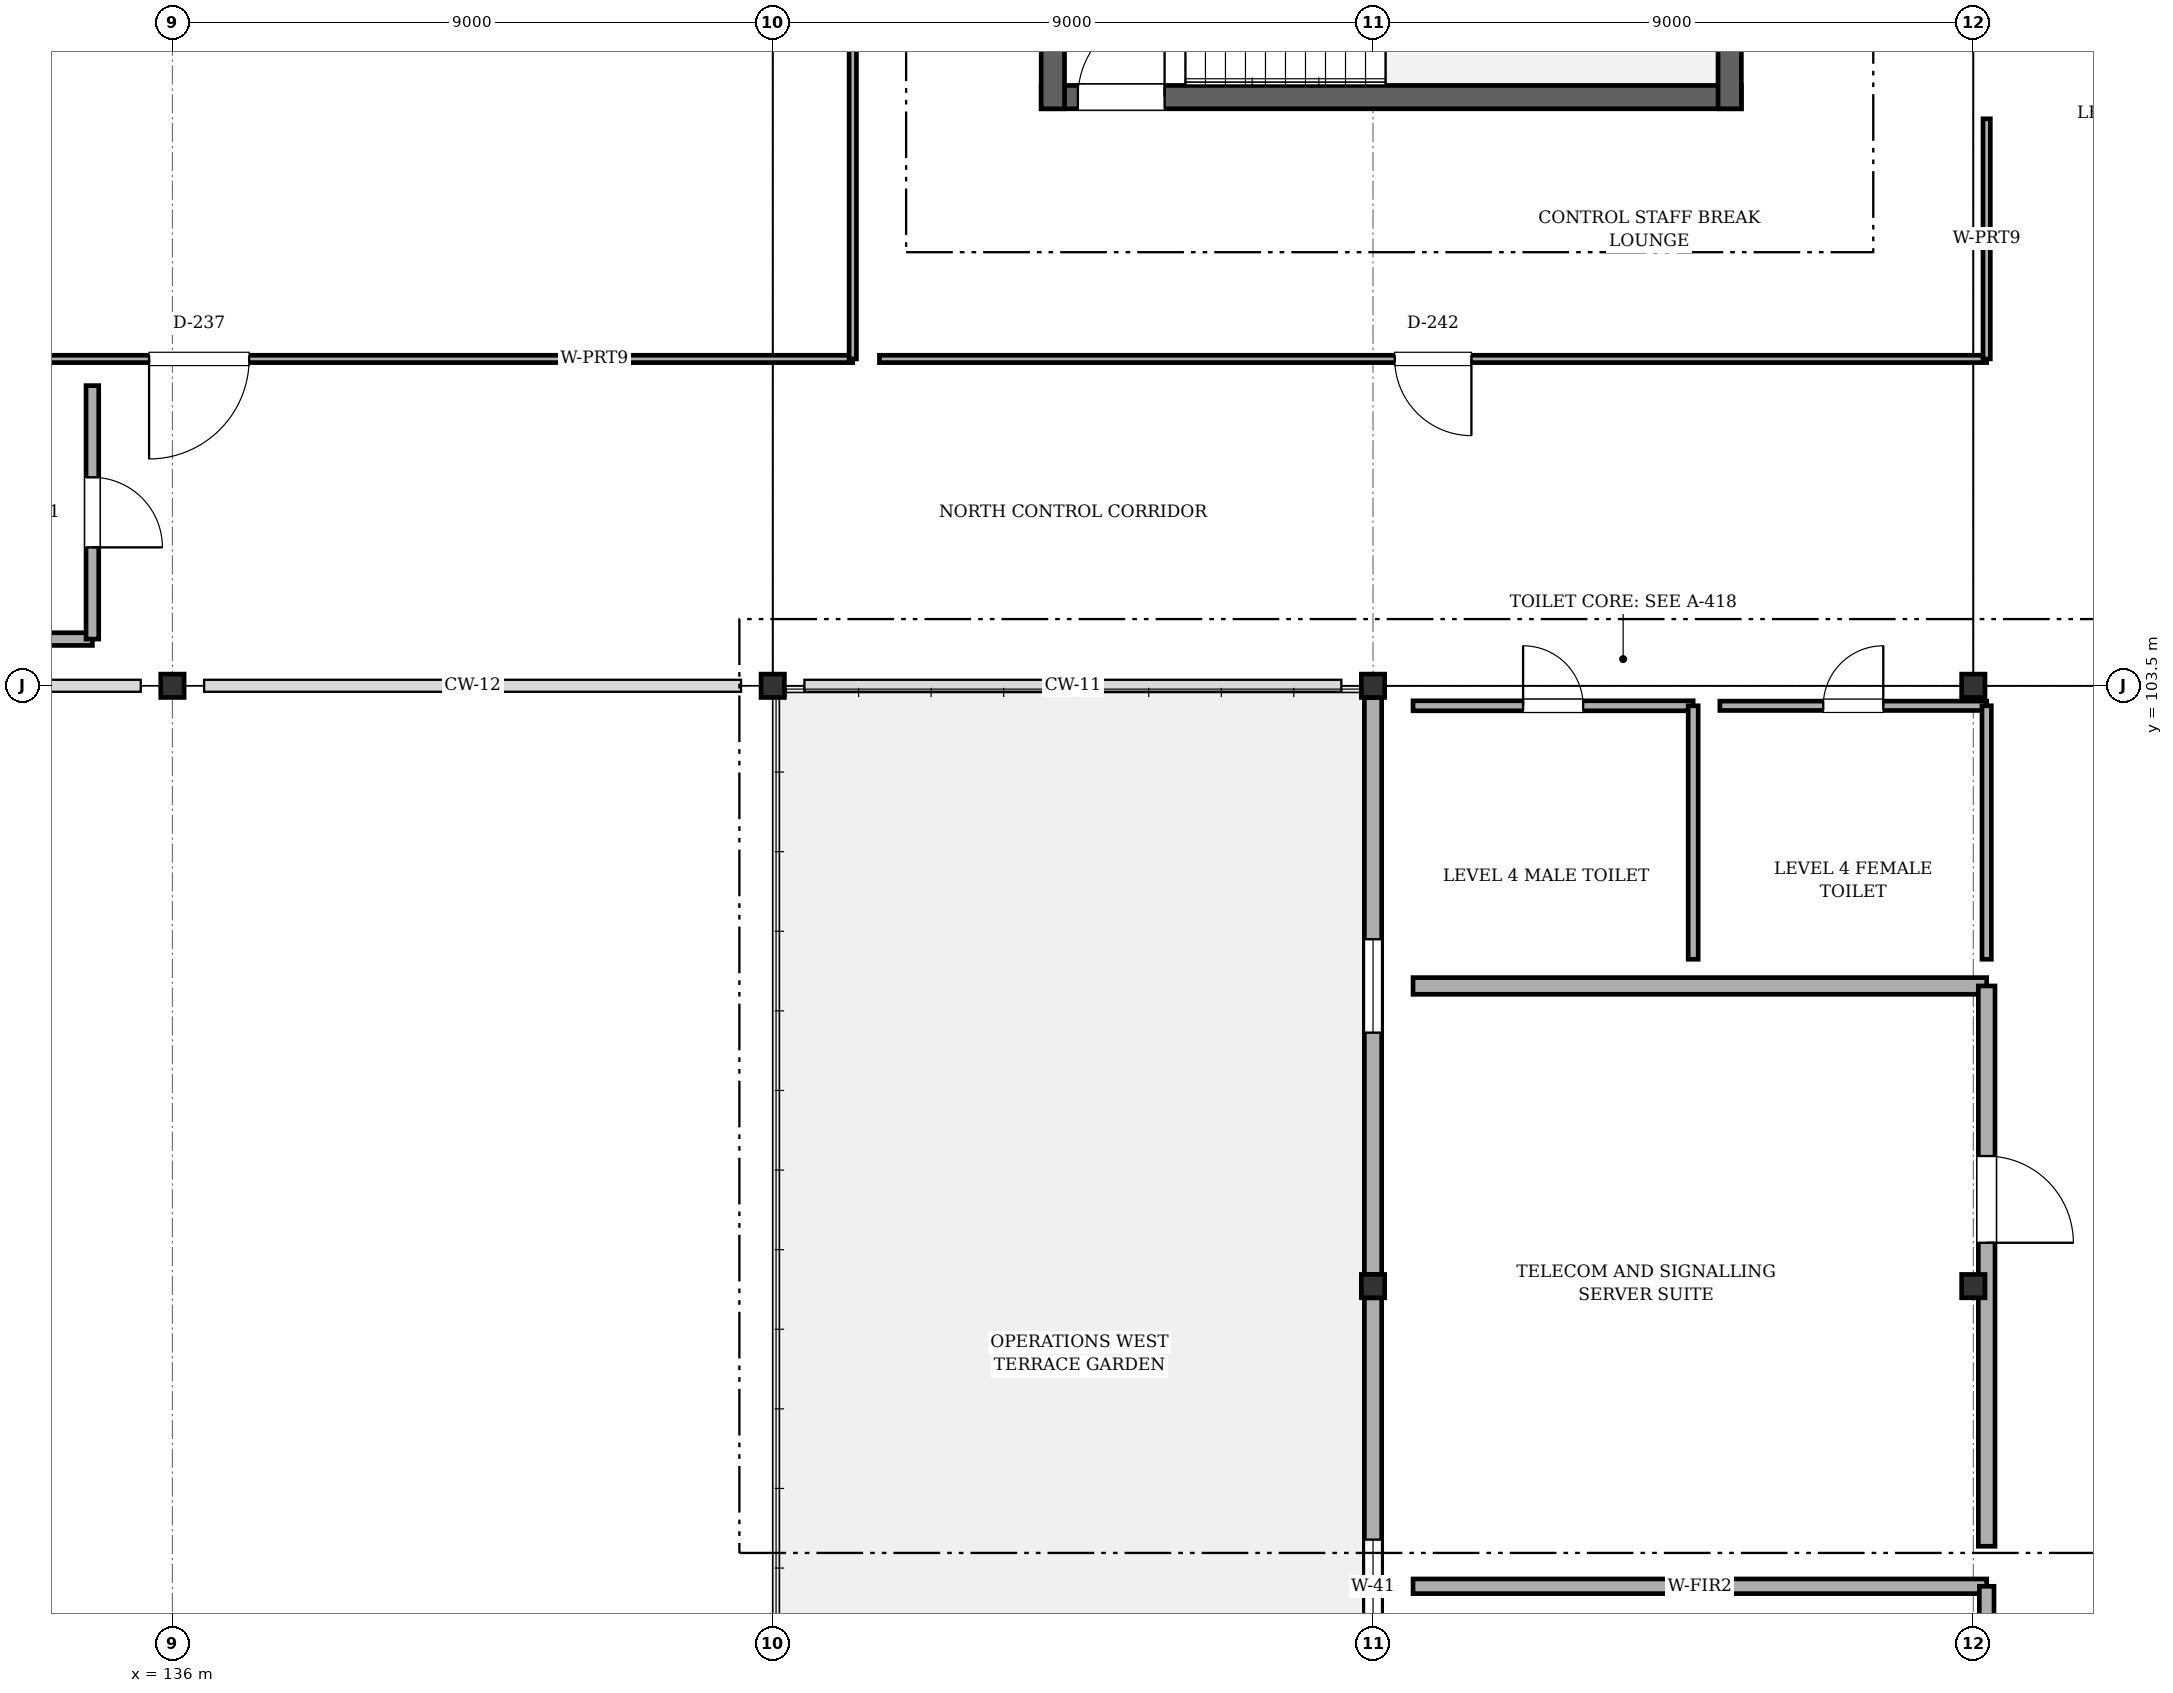
"""IFC4 building model, lengths in metres.
Left out: names, types, materials, properties, quantities, classifications, styles, units other than length and angle.
Written with IfcOpenShell. Run it as: python <this file> out.ifc"""

import sys

from ifc_helpers import new_model, si_unit, direction, frame, frame_2d, origin, origin_2d, place, context, subcontext, project, spatial, rectangle, i_section, extrude, element, fill, save


model = new_model("IFC4")
c1 = context("Model", 3, precision=1e-05, world=origin(), true_north=direction((0.0, 1.0)))
c2 = subcontext(c1, "Body", "Model", "MODEL_VIEW")
j1 = project(units=[si_unit("LENGTHUNIT", "METRE"), si_unit("PLANEANGLEUNIT", "RADIAN")], contexts=[c1])
p1 = place(None, origin())
s1 = spatial("IfcSite", under=j1, at=p1, CompositionType="ELEMENT")
p2 = place(p1, origin())
s2 = spatial("IfcBuilding", under=s1, at=p2, CompositionType="ELEMENT")
p3 = place(p2, frame((0.0, 0.0, 17.6)))
s3 = spatial("IfcBuildingStorey", under=s2, at=p3, CompositionType="ELEMENT", Elevation=17.6)
for number, where, z_axis, x_axis in (
    (1, (136.0, 103.5, 0.0), (0.0, 0.0, 1.0), (1.0, 0.0, 0.0)),
    (2, (145.0, 103.5, 0.0), (0.0, 0.0, 1.0), (1.0, 0.0, 0.0)),
    (3, (154.0, 94.5, 0.0), (0.0, 0.0, 1.0), (1.0, 0.0, 0.0)),
    (4, (154.0, 103.5, 0.0), (0.0, 0.0, 1.0), (1.0, 0.0, 0.0)),
    (5, (163.0, 94.5, 0.0), (0.0, 0.0, 1.0), (1.0, 0.0, 0.0)),
    (6, (163.0, 103.5, 0.0), (0.0, 0.0, 1.0), (1.0, 0.0, 0.0)),
):
    element("IfcColumn", number, at=place(p3, frame(where, z_axis=z_axis, x_axis=x_axis)), inside=s3, PredefinedType="COLUMN", context=c2, shape_type="SweptSolid", body=[
        extrude(i_section(OverallWidth=0.35, OverallDepth=0.35, WebThickness=0.012, FlangeThickness=0.019, FilletRadius=0.02, at=origin_2d()), origin(), (0.0, 0.0, 1.0), 3.2),
    ])
p4 = place(p3, frame((154.0, 85.675, 0.0), z_axis=(0.0, 0.0, 1.0), x_axis=(0.0, 1.0, 0.0)))
e7 = element("IfcWall", 7, at=p4, inside=s3, PredefinedType="SOLIDWALL", context=c2, shape_type="SweptSolid", body=[
    extrude(rectangle(XDim=8.65, YDim=0.26, at=frame_2d((4.325, 0.0))), origin(), (0.0, 0.0, 1.0), 2.505),
])
p5 = place(p4, frame((3.625, 0.0, 0.75)))
e8 = element("IfcOpeningElement", 8, at=p5, cuts=e7, PredefinedType="OPENING", context=c2, shape_type="SweptSolid", body=[
    extrude(rectangle(XDim=1.4, YDim=1.55, at=frame_2d((0.7, 0.775))), frame((0.0, 0.14, 0.0), z_axis=(0.0, -1.0, 0.0), x_axis=(1.0, 0.0, 0.0)), (0.0, 0.0, 1.0), 0.28),
])
p6 = place(p3, frame((154.0, 94.675, 0.0), z_axis=(0.0, 0.0, 1.0), x_axis=(0.0, 1.0, 0.0)))
e9 = element("IfcWall", 9, at=p6, inside=s3, PredefinedType="SOLIDWALL", context=c2, shape_type="SweptSolid", body=[
    extrude(rectangle(XDim=8.65, YDim=0.26, at=frame_2d((4.325, 0.0))), origin(), (0.0, 0.0, 1.0), 2.505),
])
p7 = place(p6, frame((3.625, 0.0, 0.75)))
e10 = element("IfcOpeningElement", 10, at=p7, cuts=e9, PredefinedType="OPENING", context=c2, shape_type="SweptSolid", body=[
    extrude(rectangle(XDim=1.4, YDim=1.55, at=frame_2d((0.7, 0.775))), frame((0.0, 0.14, 0.0), z_axis=(0.0, -1.0, 0.0), x_axis=(1.0, 0.0, 0.0)), (0.0, 0.0, 1.0), 0.28),
])
p8 = place(p3, frame((149.025, 112.325, 0.0), z_axis=(0.0, 0.0, 1.0), x_axis=(1.0, 0.0, 0.0)))
e11 = element("IfcWall", 11, at=p8, inside=s3, PredefinedType="SHEAR", context=c2, shape_type="SweptSolid", body=[
    extrude(rectangle(XDim=10.498, YDim=0.35, at=frame_2d((5.249, 0.0))), origin(), (0.0, 0.0, 1.0), 3.02),
])
p9 = place(p8, frame((0.55, 0.0, 0.0)))
e12 = element("IfcOpeningElement", 12, at=p9, cuts=e11, PredefinedType="OPENING", context=c2, shape_type="SweptSolid", body=[
    extrude(rectangle(XDim=1.3, YDim=2.1, at=frame_2d((0.65, 1.05))), frame((0.0, 0.185, 0.0), z_axis=(0.0, -1.0, 0.0), x_axis=(1.0, 0.0, 0.0)), (0.0, 0.0, 1.0), 0.37),
])
for number, where, z_axis, x_axis in (
    (13, (159.347, 112.15, 0.0), (0.0, 0.0, 1.0), (0.0, 1.0, 0.0)),
    (14, (149.2, 116.47, 0.0), (0.0, 0.0, 1.0), (0.0, -1.0, 0.0)),
):
    element("IfcWall", number, at=place(p3, frame(where, z_axis=z_axis, x_axis=x_axis)), inside=s3, PredefinedType="SHEAR", context=c2, shape_type="SweptSolid", body=[
        extrude(rectangle(XDim=4.32, YDim=0.35, at=frame_2d((2.16, 0.0))), origin(), (0.0, 0.0, 1.0), 3.02),
    ])
p10 = place(p3, frame((146.2, 108.4, 0.0), z_axis=(0.0, 0.0, 1.0), x_axis=(-1.0, 0.0, 0.0)))
e15 = element("IfcWall", 15, at=p10, inside=s3, PredefinedType="PARTITIONING", context=c2, shape_type="SweptSolid", body=[
    extrude(rectangle(XDim=19.6, YDim=0.11, at=frame_2d((9.8, 0.0))), origin(), (0.0, 0.0, 1.0), 2.395),
])
p11 = place(p10, frame((9.05, 0.0, 0.0)))
e16 = element("IfcOpeningElement", 16, at=p11, cuts=e15, PredefinedType="OPENING", context=c2, shape_type="SweptSolid", body=[
    extrude(rectangle(XDim=1.5, YDim=2.15, at=frame_2d((0.75, 1.075))), frame((0.0, 0.065, 0.0), z_axis=(0.0, -1.0, 0.0), x_axis=(1.0, 0.0, 0.0)), (0.0, 0.0, 1.0), 0.13),
])
p12 = place(p3, frame((146.2, 125.4, 0.0), z_axis=(0.0, 0.0, 1.0), x_axis=(0.0, -1.0, 0.0)))
e17 = element("IfcWall", 17, at=p12, inside=s3, PredefinedType="PARTITIONING", context=c2, shape_type="SweptSolid", body=[
    extrude(rectangle(XDim=17.0, YDim=0.11, at=frame_2d((8.5, 0.0))), origin(), (0.0, 0.0, 1.0), 2.535),
])
p13 = place(p3, frame((154.6, 90.0, 0.0), z_axis=(0.0, 0.0, 1.0), x_axis=(1.0, 0.0, 0.0)))
e18 = element("IfcWall", 18, at=p13, inside=s3, PredefinedType="SOLIDWALL", context=c2, shape_type="SweptSolid", body=[
    extrude(rectangle(XDim=8.6, YDim=0.22, at=frame_2d((4.3, 0.0))), origin(), (0.0, 0.0, 1.0), 2.555),
])
p14 = place(p3, frame((163.2, 90.0, 0.0), z_axis=(0.0, 0.0, 1.0), x_axis=(0.0, -1.0, 0.0)))
e19 = element("IfcWall", 19, at=p14, inside=s3, PredefinedType="SOLIDWALL", context=c2, shape_type="SweptSolid", body=[
    extrude(rectangle(XDim=13.0, YDim=0.22, at=frame_2d((6.5, 0.0))), origin(), (0.0, 0.0, 1.0), 2.505),
])
p15 = place(p14, frame((5.85, 0.0, 0.0)))
e20 = element("IfcOpeningElement", 20, at=p15, cuts=e19, PredefinedType="OPENING", context=c2, shape_type="SweptSolid", body=[
    extrude(rectangle(XDim=1.3, YDim=2.1, at=frame_2d((0.65, 1.05))), frame((0.0, 0.12, 0.0), z_axis=(0.0, -1.0, 0.0), x_axis=(1.0, 0.0, 0.0)), (0.0, 0.0, 1.0), 0.24),
])
p16 = place(p3, frame((154.6, 99.0, 0.0), z_axis=(0.0, 0.0, 1.0), x_axis=(1.0, 0.0, 0.0)))
e21 = element("IfcWall", 21, at=p16, inside=s3, PredefinedType="SOLIDWALL", context=c2, shape_type="SweptSolid", body=[
    extrude(rectangle(XDim=8.6, YDim=0.25, at=frame_2d((4.3, 0.0))), origin(), (0.0, 0.0, 1.0), 2.555),
])
p17 = place(p3, frame((163.2, 99.0, 0.0), z_axis=(0.0, 0.0, 1.0), x_axis=(0.0, -1.0, 0.0)))
e22 = element("IfcWall", 22, at=p17, inside=s3, PredefinedType="SOLIDWALL", context=c2, shape_type="SweptSolid", body=[
    extrude(rectangle(XDim=8.4, YDim=0.25, at=frame_2d((4.2, 0.0))), origin(), (0.0, 0.0, 1.0), 2.505),
])
p18 = place(p17, frame((2.55, 0.0, 0.0)))
e23 = element("IfcOpeningElement", 23, at=p18, cuts=e22, PredefinedType="OPENING", context=c2, shape_type="SweptSolid", body=[
    extrude(rectangle(XDim=1.3, YDim=2.1, at=frame_2d((0.65, 1.05))), frame((0.0, 0.135, 0.0), z_axis=(0.0, -1.0, 0.0), x_axis=(1.0, 0.0, 0.0)), (0.0, 0.0, 1.0), 0.27),
])
p19 = place(p3, frame((163.2, 108.4, 0.0), z_axis=(0.0, 0.0, 1.0), x_axis=(-1.0, 0.0, 0.0)))
e24 = element("IfcWall", 24, at=p19, inside=s3, PredefinedType="PARTITIONING", context=c2, shape_type="SweptSolid", body=[
    extrude(rectangle(XDim=16.6, YDim=0.11, at=frame_2d((8.3, 0.0))), origin(), (0.0, 0.0, 1.0), 2.355),
])
p20 = place(p19, frame((7.725, 0.0, 0.0)))
e25 = element("IfcOpeningElement", 25, at=p20, cuts=e24, PredefinedType="OPENING", context=c2, shape_type="SweptSolid", body=[
    extrude(rectangle(XDim=1.15, YDim=2.1, at=frame_2d((0.575, 1.05))), frame((0.0, 0.065, 0.0), z_axis=(0.0, -1.0, 0.0), x_axis=(1.0, 0.0, 0.0)), (0.0, 0.0, 1.0), 0.13),
])
p21 = place(p3, frame((163.2, 112.0, 0.0), z_axis=(0.0, 0.0, 1.0), x_axis=(0.0, -1.0, 0.0)))
e26 = element("IfcWall", 26, at=p21, inside=s3, PredefinedType="PARTITIONING", context=c2, shape_type="SweptSolid", body=[
    extrude(rectangle(XDim=3.6, YDim=0.11, at=frame_2d((1.8, 0.0))), origin(), (0.0, 0.0, 1.0), 2.355),
])
p22 = place(p3, frame((154.6, 103.2, 0.0), z_axis=(0.0, 0.0, 1.0), x_axis=(1.0, 0.0, 0.0)))
e27 = element("IfcWall", 27, at=p22, inside=s3, PredefinedType="PARTITIONING", context=c2, shape_type="SweptSolid", body=[
    extrude(rectangle(XDim=4.2, YDim=0.15, at=frame_2d((2.1, 0.0))), origin(), (0.0, 0.0, 1.0), 2.505),
])
p23 = place(p22, frame((1.65, 0.0, 0.0)))
e28 = element("IfcOpeningElement", 28, at=p23, cuts=e27, PredefinedType="OPENING", context=c2, shape_type="SweptSolid", body=[
    extrude(rectangle(XDim=0.9, YDim=2.1, at=frame_2d((0.45, 1.05))), frame((0.0, 0.085, 0.0), z_axis=(0.0, -1.0, 0.0), x_axis=(1.0, 0.0, 0.0)), (0.0, 0.0, 1.0), 0.17),
])
p24 = place(p3, frame((158.8, 103.2, 0.0), z_axis=(0.0, 0.0, 1.0), x_axis=(0.0, -1.0, 0.0)))
e29 = element("IfcWall", 29, at=p24, inside=s3, PredefinedType="PARTITIONING", context=c2, shape_type="SweptSolid", body=[
    extrude(rectangle(XDim=3.8, YDim=0.15, at=frame_2d((1.9, 0.0))), origin(), (0.0, 0.0, 1.0), 2.505),
])
p25 = place(p3, frame((159.2, 103.2, 0.0), z_axis=(0.0, 0.0, 1.0), x_axis=(1.0, 0.0, 0.0)))
e30 = element("IfcWall", 30, at=p25, inside=s3, PredefinedType="PARTITIONING", context=c2, shape_type="SweptSolid", body=[
    extrude(rectangle(XDim=4.0, YDim=0.14, at=frame_2d((2.0, 0.0))), origin(), (0.0, 0.0, 1.0), 2.355),
])
p26 = place(p25, frame((1.55, 0.0, 0.0)))
e31 = element("IfcOpeningElement", 31, at=p26, cuts=e30, PredefinedType="OPENING", context=c2, shape_type="SweptSolid", body=[
    extrude(rectangle(XDim=0.9, YDim=2.1, at=frame_2d((0.45, 1.05))), frame((0.0, 0.08, 0.0), z_axis=(0.0, -1.0, 0.0), x_axis=(1.0, 0.0, 0.0)), (0.0, 0.0, 1.0), 0.16),
])
p27 = place(p3, frame((163.2, 103.2, 0.0), z_axis=(0.0, 0.0, 1.0), x_axis=(0.0, -1.0, 0.0)))
e32 = element("IfcWall", 32, at=p27, inside=s3, PredefinedType="PARTITIONING", context=c2, shape_type="SweptSolid", body=[
    extrude(rectangle(XDim=3.8, YDim=0.14, at=frame_2d((1.9, 0.0))), origin(), (0.0, 0.0, 1.0), 2.355),
])
p28 = place(p3, frame((134.8, 104.2, 0.0), z_axis=(0.0, 0.0, 1.0), x_axis=(-1.0, 0.0, 0.0)))
e33 = element("IfcWall", 33, at=p28, inside=s3, PredefinedType="PARTITIONING", context=c2, shape_type="SweptSolid", body=[
    extrude(rectangle(XDim=8.2, YDim=0.19, at=frame_2d((4.1, 0.0))), origin(), (0.0, 0.0, 1.0), 2.41),
])
p29 = place(p3, frame((134.8, 108.0, 0.0), z_axis=(0.0, 0.0, 1.0), x_axis=(0.0, -1.0, 0.0)))
e34 = element("IfcWall", 34, at=p29, inside=s3, PredefinedType="PARTITIONING", context=c2, shape_type="SweptSolid", body=[
    extrude(rectangle(XDim=3.8, YDim=0.19, at=frame_2d((1.9, 0.0))), origin(), (0.0, 0.0, 1.0), 2.51),
])
p30 = place(p29, frame((1.375, 0.0, 0.0)))
e35 = element("IfcOpeningElement", 35, at=p30, cuts=e34, PredefinedType="OPENING", context=c2, shape_type="SweptSolid", body=[
    extrude(rectangle(XDim=1.05, YDim=2.1, at=frame_2d((0.525, 1.05))), frame((0.0, 0.105, 0.0), z_axis=(0.0, -1.0, 0.0), x_axis=(1.0, 0.0, 0.0)), (0.0, 0.0, 1.0), 0.21),
])
p31 = place(p5, origin())
e36 = element("IfcWindow", 36, at=p31, inside=s3, PartitioningType="SINGLE_PANEL", PredefinedType="WINDOW", context=c2, shape_type="SweptSolid", body=[
    extrude(rectangle(XDim=1.4, YDim=1.55, at=frame_2d((0.7, 0.775))), frame((0.0, 0.03, 0.0), z_axis=(0.0, -1.0, 0.0), x_axis=(1.0, 0.0, 0.0)), (0.0, 0.0, 1.0), 0.06),
])
fill(e8, e36)
p32 = place(p7, origin())
e37 = element("IfcWindow", 37, at=p32, inside=s3, PartitioningType="SINGLE_PANEL", PredefinedType="WINDOW", context=c2, shape_type="SweptSolid", body=[
    extrude(rectangle(XDim=1.4, YDim=1.55, at=frame_2d((0.7, 0.775))), frame((0.0, 0.03, 0.0), z_axis=(0.0, -1.0, 0.0), x_axis=(1.0, 0.0, 0.0)), (0.0, 0.0, 1.0), 0.06),
])
fill(e10, e37)
p33 = place(p9, origin())
e38 = element("IfcDoor", 38, at=p33, inside=s3, OperationType="SINGLE_SWING_RIGHT", PredefinedType="DOOR", context=c2, shape_type="SweptSolid", body=[
    extrude(rectangle(XDim=1.3, YDim=2.1, at=frame_2d((0.65, 1.05))), frame((0.0, 0.025, 0.0), z_axis=(0.0, -1.0, 0.0), x_axis=(1.0, 0.0, 0.0)), (0.0, 0.0, 1.0), 0.05),
])
fill(e12, e38)
p34 = place(p11, origin())
e39 = element("IfcDoor", 39, at=p34, inside=s3, OperationType="SINGLE_SWING_RIGHT", PredefinedType="DOOR", context=c2, shape_type="SweptSolid", body=[
    extrude(rectangle(XDim=1.5, YDim=2.15, at=frame_2d((0.75, 1.075))), frame((0.0, 0.025, 0.0), z_axis=(0.0, -1.0, 0.0), x_axis=(1.0, 0.0, 0.0)), (0.0, 0.0, 1.0), 0.05),
])
fill(e16, e39)
p35 = place(p18, origin())
e40 = element("IfcDoor", 40, at=p35, inside=s3, OperationType="SINGLE_SWING_RIGHT", PredefinedType="DOOR", context=c2, shape_type="SweptSolid", body=[
    extrude(rectangle(XDim=1.3, YDim=2.1, at=frame_2d((0.65, 1.05))), frame((0.0, 0.025, 0.0), z_axis=(0.0, -1.0, 0.0), x_axis=(1.0, 0.0, 0.0)), (0.0, 0.0, 1.0), 0.05),
])
fill(e23, e40)
p36 = place(p20, origin())
e41 = element("IfcDoor", 41, at=p36, inside=s3, OperationType="SINGLE_SWING_LEFT", PredefinedType="DOOR", context=c2, shape_type="SweptSolid", body=[
    extrude(rectangle(XDim=1.15, YDim=2.1, at=frame_2d((0.575, 1.05))), frame((0.0, 0.025, 0.0), z_axis=(0.0, -1.0, 0.0), x_axis=(1.0, 0.0, 0.0)), (0.0, 0.0, 1.0), 0.05),
])
fill(e25, e41)
p37 = place(p23, origin())
e42 = element("IfcDoor", 42, at=p37, inside=s3, OperationType="SINGLE_SWING_LEFT", PredefinedType="DOOR", context=c2, shape_type="SweptSolid", body=[
    extrude(rectangle(XDim=0.9, YDim=2.1, at=frame_2d((0.45, 1.05))), frame((0.0, 0.025, 0.0), z_axis=(0.0, -1.0, 0.0), x_axis=(1.0, 0.0, 0.0)), (0.0, 0.0, 1.0), 0.05),
])
fill(e28, e42)
p38 = place(p26, origin())
e43 = element("IfcDoor", 43, at=p38, inside=s3, OperationType="SINGLE_SWING_RIGHT", PredefinedType="DOOR", context=c2, shape_type="SweptSolid", body=[
    extrude(rectangle(XDim=0.9, YDim=2.1, at=frame_2d((0.45, 1.05))), frame((0.0, 0.025, 0.0), z_axis=(0.0, -1.0, 0.0), x_axis=(1.0, 0.0, 0.0)), (0.0, 0.0, 1.0), 0.05),
])
fill(e31, e43)
p39 = place(p30, origin())
e44 = element("IfcDoor", 44, at=p39, inside=s3, OperationType="SINGLE_SWING_RIGHT", PredefinedType="DOOR", context=c2, shape_type="SweptSolid", body=[
    extrude(rectangle(XDim=1.05, YDim=2.1, at=frame_2d((0.525, 1.05))), frame((0.0, 0.025, 0.0), z_axis=(0.0, -1.0, 0.0), x_axis=(1.0, 0.0, 0.0)), (0.0, 0.0, 1.0), 0.05),
])
fill(e35, e44)
save(model, sys.argv[1])
